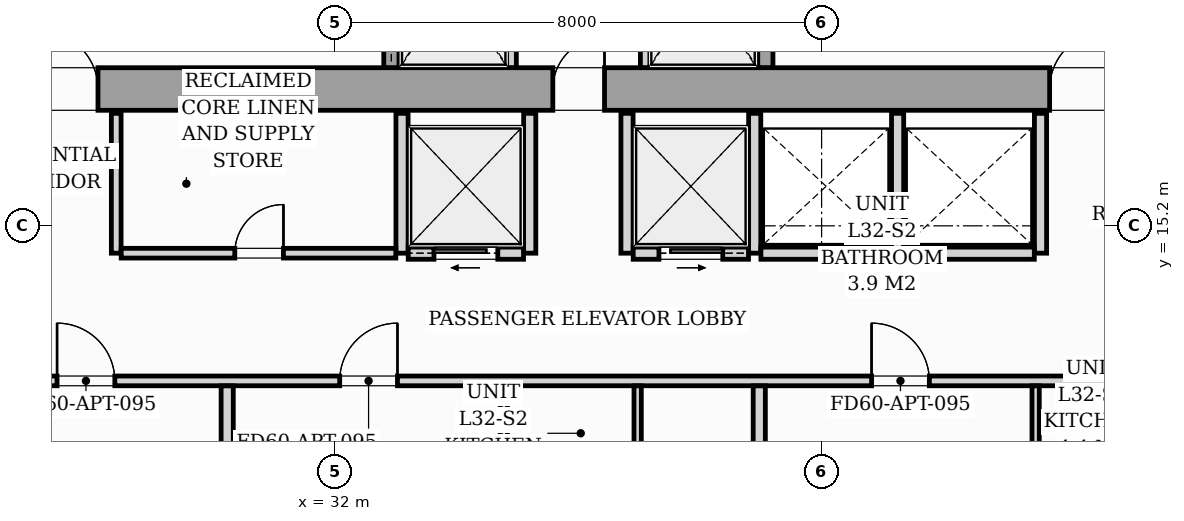
"""IFC4 building model, lengths in metres.
Left out: names, types, materials, properties, quantities, classifications, styles, units other than length and angle.
Written with IfcOpenShell. Run it as: python <this file> out.ifc"""

import sys

from ifc_helpers import new_model, si_unit, direction, frame, frame_2d, origin, origin_2d, place, context, subcontext, project, spatial, rectangle, i_section, extrude, source, transform, mapped, element, fill, save


model = new_model("IFC4")
c1 = context("Model", 3, precision=1e-05, world=origin(), true_north=direction((0.0, 1.0)))
c2 = subcontext(c1, "Body", "Model", "MODEL_VIEW")
j1 = project(units=[si_unit("LENGTHUNIT", "METRE"), si_unit("PLANEANGLEUNIT", "RADIAN")], contexts=[c1])
p1 = place(None, origin())
s1 = spatial("IfcSite", under=j1, at=p1, CompositionType="ELEMENT")
p2 = place(p1, origin())
s2 = spatial("IfcBuilding", under=s1, at=p2, CompositionType="ELEMENT")
p3 = place(p2, frame((0.0, 0.0, 113.0)))
s3 = spatial("IfcBuildingStorey", under=s2, at=p3, CompositionType="ELEMENT", Elevation=113.0)
m1 = source(origin(), c2, "Body", "SweptSolid", [
    extrude(i_section(OverallWidth=0.427, OverallDepth=0.483, WebThickness=0.051, FlangeThickness=0.082, FilletRadius=0.018, at=origin_2d()), origin(), (0.0, 0.0, 1.0), 3.196),
])
for number, where, z_axis, x_axis in (
    (1, (33.12, 17.4, 0.002), (0.0, 0.0, 1.0), (1.0, 0.0, 0.0)),
    (2, (38.88, 17.4, 0.002), (0.0, 0.0, 1.0), (1.0, 0.0, 0.0)),
):
    element("IfcColumn", number, at=place(p3, frame(where, z_axis=z_axis, x_axis=x_axis)), inside=s3, PredefinedType="PILASTER", context=c2, shape_type="MappedRepresentation", body=[
        mapped(m1, transform((0.0, 0.0, 0.0), scale=1.0)),
    ])
p4 = place(p3, frame((26.1, 17.45, 0.0), z_axis=(0.0, 0.0, 1.0), x_axis=(1.0, 0.0, 0.0)))
e3 = element("IfcWall", 3, at=p4, inside=s3, PredefinedType="SHEAR", context=c2, shape_type="SweptSolid", body=[
    extrude(rectangle(XDim=19.8, YDim=0.7, at=frame_2d((9.9, 0.0))), origin(), (0.0, 0.0, 1.0), 3.2),
])
p5 = place(p4, frame((1.05, 0.0, 0.0)))
e4 = element("IfcOpeningElement", 4, at=p5, cuts=e3, PredefinedType="OPENING", context=c2, shape_type="SweptSolid", body=[
    extrude(rectangle(XDim=0.95, YDim=2.06, at=frame_2d((0.475, 1.03))), frame((0.0, 0.36, 0.0), z_axis=(0.0, -1.0, 0.0), x_axis=(1.0, 0.0, 0.0)), (0.0, 0.0, 1.0), 0.72),
])
p6 = place(p4, frame((9.48, 0.0, 0.0)))
e5 = element("IfcOpeningElement", 5, at=p6, cuts=e3, PredefinedType="OPENING", context=c2, shape_type="SweptSolid", body=[
    extrude(rectangle(XDim=0.85, YDim=2.0, at=frame_2d((0.425, 1.0))), frame((0.0, 0.36, 0.0), z_axis=(0.0, -1.0, 0.0), x_axis=(1.0, 0.0, 0.0)), (0.0, 0.0, 1.0), 0.72),
])
p7 = place(p4, frame((17.65, 0.0, 0.0)))
e6 = element("IfcOpeningElement", 6, at=p7, cuts=e3, PredefinedType="OPENING", context=c2, shape_type="SweptSolid", body=[
    extrude(rectangle(XDim=0.95, YDim=2.06, at=frame_2d((0.475, 1.03))), frame((0.0, 0.36, 0.0), z_axis=(0.0, -1.0, 0.0), x_axis=(1.0, 0.0, 0.0)), (0.0, 0.0, 1.0), 0.72),
])
p8 = place(p3, frame((32.925, 17.802, 0.0), z_axis=(0.0, 0.0, 1.0), x_axis=(0.0, 1.0, 0.0)))
e7 = element("IfcWall", 7, at=p8, inside=s3, PredefinedType="SOLIDWALL", context=c2, shape_type="SweptSolid", body=[
    extrude(rectangle(XDim=2.646, YDim=0.25, at=frame_2d((1.323, 0.0))), origin(), (0.0, 0.0, 1.0), 3.2),
])
p9 = place(p8, frame((0.598, 0.0, 0.0)))
e8 = element("IfcOpeningElement", 8, at=p9, cuts=e7, PredefinedType="OPENING", context=c2, shape_type="SweptSolid", body=[
    extrude(rectangle(XDim=1.1, YDim=2.08, at=frame_2d((0.55, 1.04))), frame((0.0, 0.135, 0.0), z_axis=(0.0, -1.0, 0.0), x_axis=(1.0, 0.0, 0.0)), (0.0, 0.0, 1.0), 0.27),
])
for number, where, z_axis, x_axis in (
    (9, (34.9, 17.802, 0.0), (0.0, 0.0, 1.0), (0.0, 1.0, 0.0)),
    (10, (37.1, 17.802, 0.0), (0.0, 0.0, 1.0), (0.0, 1.0, 0.0)),
):
    element("IfcWall", number, at=place(p3, frame(where, z_axis=z_axis, x_axis=x_axis)), inside=s3, PredefinedType="PARTITIONING", context=c2, shape_type="SweptSolid", body=[
        extrude(rectangle(XDim=2.646, YDim=0.16, at=frame_2d((1.323, 0.0))), origin(), (0.0, 0.0, 1.0), 2.94),
    ])
p10 = place(p3, frame((39.075, 17.802, 0.0), z_axis=(0.0, 0.0, 1.0), x_axis=(0.0, 1.0, 0.0)))
e11 = element("IfcWall", 11, at=p10, inside=s3, PredefinedType="SOLIDWALL", context=c2, shape_type="SweptSolid", body=[
    extrude(rectangle(XDim=2.646, YDim=0.25, at=frame_2d((1.323, 0.0))), origin(), (0.0, 0.0, 1.0), 3.2),
])
p11 = place(p10, frame((0.598, 0.0, 0.0)))
e12 = element("IfcOpeningElement", 12, at=p11, cuts=e11, PredefinedType="OPENING", context=c2, shape_type="SweptSolid", body=[
    extrude(rectangle(XDim=1.1, YDim=2.08, at=frame_2d((0.55, 1.04))), frame((0.0, 0.135, 0.0), z_axis=(0.0, -1.0, 0.0), x_axis=(1.0, 0.0, 0.0)), (0.0, 0.0, 1.0), 0.27),
])
p12 = place(p3, frame((28.4, 14.75, 0.0), z_axis=(0.0, 0.0, 1.0), x_axis=(0.0, 1.0, 0.0)))
e13 = element("IfcWall", 13, at=p12, inside=s3, PredefinedType="PARTITIONING", context=c2, shape_type="SweptSolid", body=[
    extrude(rectangle(XDim=2.3, YDim=0.16, at=frame_2d((1.15, 0.0))), origin(), (0.0, 0.0, 1.0), 2.94),
])
p13 = place(p3, frame((33.1, 14.75, 0.0), z_axis=(0.0, 0.0, 1.0), x_axis=(0.0, 1.0, 0.0)))
e14 = element("IfcWall", 14, at=p13, inside=s3, PredefinedType="PARTITIONING", context=c2, shape_type="SweptSolid", body=[
    extrude(rectangle(XDim=2.3, YDim=0.2, at=frame_2d((1.15, 0.0))), origin(), (0.0, 0.0, 1.0), 2.94),
])
p14 = place(p3, frame((28.482, 14.75, 0.0), z_axis=(0.0, 0.0, 1.0), x_axis=(1.0, 0.0, 0.0)))
e15 = element("IfcWall", 15, at=p14, inside=s3, PredefinedType="PARTITIONING", context=c2, shape_type="SweptSolid", body=[
    extrude(rectangle(XDim=4.516, YDim=0.16, at=frame_2d((2.258, 0.0))), origin(), (0.0, 0.0, 1.0), 2.94),
])
p15 = place(p14, frame((1.868, 0.0, 0.0)))
e16 = element("IfcOpeningElement", 16, at=p15, cuts=e15, PredefinedType="OPENING", context=c2, shape_type="SweptSolid", body=[
    extrude(rectangle(XDim=0.8, YDim=2.05, at=frame_2d((0.4, 1.025))), frame((0.0, 0.09, 0.0), z_axis=(0.0, -1.0, 0.0), x_axis=(1.0, 0.0, 0.0)), (0.0, 0.0, 1.0), 0.18),
])
p16 = place(p3, frame((35.2, 14.75, 0.0), z_axis=(0.0, 0.0, 1.0), x_axis=(0.0, 1.0, 0.0)))
e17 = element("IfcWall", 17, at=p16, inside=s3, PredefinedType="PARTITIONING", context=c2, shape_type="SweptSolid", body=[
    extrude(rectangle(XDim=2.3, YDim=0.2, at=frame_2d((1.15, 0.0))), origin(), (0.0, 0.0, 1.0), 2.94),
])
p17 = place(p3, frame((33.202, 14.75, 0.0), z_axis=(0.0, 0.0, 1.0), x_axis=(1.0, 0.0, 0.0)))
e18 = element("IfcWall", 18, at=p17, inside=s3, PredefinedType="PARTITIONING", context=c2, shape_type="SweptSolid", body=[
    extrude(rectangle(XDim=1.896, YDim=0.2, at=frame_2d((0.948, 0.0))), origin(), (0.0, 0.0, 1.0), 2.94),
])
p18 = place(p17, frame((0.423, 0.0, 0.0)))
e19 = element("IfcOpeningElement", 19, at=p18, cuts=e18, PredefinedType="OPENING", context=c2, shape_type="SweptSolid", body=[
    extrude(rectangle(XDim=1.05, YDim=2.08, at=frame_2d((0.525, 1.04))), frame((0.0, 0.11, 0.0), z_axis=(0.0, -1.0, 0.0), x_axis=(1.0, 0.0, 0.0)), (0.0, 0.0, 1.0), 0.22),
])
for number, where, z_axis, x_axis in (
    (20, (36.8, 14.75, 0.0), (0.0, 0.0, 1.0), (0.0, 1.0, 0.0)),
    (21, (38.9, 14.75, 0.0), (0.0, 0.0, 1.0), (0.0, 1.0, 0.0)),
):
    element("IfcWall", number, at=place(p3, frame(where, z_axis=z_axis, x_axis=x_axis)), inside=s3, PredefinedType="PARTITIONING", context=c2, shape_type="SweptSolid", body=[
        extrude(rectangle(XDim=2.3, YDim=0.2, at=frame_2d((1.15, 0.0))), origin(), (0.0, 0.0, 1.0), 2.94),
    ])
p19 = place(p3, frame((36.902, 14.75, 0.0), z_axis=(0.0, 0.0, 1.0), x_axis=(1.0, 0.0, 0.0)))
e22 = element("IfcWall", 22, at=p19, inside=s3, PredefinedType="PARTITIONING", context=c2, shape_type="SweptSolid", body=[
    extrude(rectangle(XDim=1.896, YDim=0.2, at=frame_2d((0.948, 0.0))), origin(), (0.0, 0.0, 1.0), 2.94),
])
p20 = place(p19, frame((0.423, 0.0, 0.0)))
e23 = element("IfcOpeningElement", 23, at=p20, cuts=e22, PredefinedType="OPENING", context=c2, shape_type="SweptSolid", body=[
    extrude(rectangle(XDim=1.05, YDim=2.08, at=frame_2d((0.525, 1.04))), frame((0.0, 0.11, 0.0), z_axis=(0.0, -1.0, 0.0), x_axis=(1.0, 0.0, 0.0)), (0.0, 0.0, 1.0), 0.22),
])
for number, where, z_axis, x_axis in (
    (24, (41.25, 14.75, 0.0), (0.0, 0.0, 1.0), (0.0, 1.0, 0.0)),
    (25, (43.6, 14.75, 0.0), (0.0, 0.0, 1.0), (0.0, 1.0, 0.0)),
):
    element("IfcWall", number, at=place(p3, frame(where, z_axis=z_axis, x_axis=x_axis)), inside=s3, PredefinedType="PARTITIONING", context=c2, shape_type="SweptSolid", body=[
        extrude(rectangle(XDim=2.3, YDim=0.2, at=frame_2d((1.15, 0.0))), origin(), (0.0, 0.0, 1.0), 2.94),
    ])
for number, where, z_axis, x_axis in (
    (26, (39.002, 14.75, 0.0), (0.0, 0.0, 1.0), (1.0, 0.0, 0.0)),
    (27, (41.352, 14.75, 0.0), (0.0, 0.0, 1.0), (1.0, 0.0, 0.0)),
):
    element("IfcWall", number, at=place(p3, frame(where, z_axis=z_axis, x_axis=x_axis)), inside=s3, PredefinedType="PARTITIONING", context=c2, shape_type="SweptSolid", body=[
        extrude(rectangle(XDim=2.146, YDim=0.2, at=frame_2d((1.073, 0.0))), origin(), (0.0, 0.0, 1.0), 2.94),
    ])
p21 = place(p3, frame((21.5, 12.65, 0.0), z_axis=(0.0, 0.0, 1.0), x_axis=(1.0, 0.0, 0.0)))
e28 = element("IfcWall", 28, at=p21, inside=s3, PredefinedType="PARTITIONING", context=c2, shape_type="SweptSolid", body=[
    extrude(rectangle(XDim=26.2, YDim=0.16, at=frame_2d((13.1, 0.0))), origin(), (0.0, 0.0, 1.0), 2.94),
])
p22 = place(p21, frame((5.927, 0.0, 0.0)))
e29 = element("IfcOpeningElement", 29, at=p22, cuts=e28, PredefinedType="OPENING", context=c2, shape_type="SweptSolid", body=[
    extrude(rectangle(XDim=0.95, YDim=2.06, at=frame_2d((0.475, 1.03))), frame((0.0, 0.09, 0.0), z_axis=(0.0, -1.0, 0.0), x_axis=(1.0, 0.0, 0.0)), (0.0, 0.0, 1.0), 0.18),
])
p23 = place(p21, frame((10.575, 0.0, 0.0)))
e30 = element("IfcOpeningElement", 30, at=p23, cuts=e28, PredefinedType="OPENING", context=c2, shape_type="SweptSolid", body=[
    extrude(rectangle(XDim=0.95, YDim=2.06, at=frame_2d((0.475, 1.03))), frame((0.0, 0.09, 0.0), z_axis=(0.0, -1.0, 0.0), x_axis=(1.0, 0.0, 0.0)), (0.0, 0.0, 1.0), 0.18),
])
p24 = place(p21, frame((19.322, 0.0, 0.0)))
e31 = element("IfcOpeningElement", 31, at=p24, cuts=e28, PredefinedType="OPENING", context=c2, shape_type="SweptSolid", body=[
    extrude(rectangle(XDim=0.95, YDim=2.06, at=frame_2d((0.475, 1.03))), frame((0.0, 0.09, 0.0), z_axis=(0.0, -1.0, 0.0), x_axis=(1.0, 0.0, 0.0)), (0.0, 0.0, 1.0), 0.18),
])
p25 = place(p3, frame((30.225, 5.653, 0.0), z_axis=(0.0, 0.0, 1.0), x_axis=(0.0, 1.0, 0.0)))
e32 = element("IfcWall", 32, at=p25, inside=s3, PredefinedType="PARTITIONING", context=c2, shape_type="SweptSolid", body=[
    extrude(rectangle(XDim=6.916, YDim=0.2, at=frame_2d((3.458, 0.0))), origin(), (0.0, 0.0, 1.0), 2.94),
])
for number, where, z_axis, x_axis in (
    (33, (34.775, 10.462, 0.0), (0.0, 0.0, 1.0), (0.0, 1.0, 0.0)),
    (34, (36.975, 10.462, 0.0), (0.0, 0.0, 1.0), (0.0, 1.0, 0.0)),
):
    element("IfcWall", number, at=place(p3, frame(where, z_axis=z_axis, x_axis=x_axis)), inside=s3, PredefinedType="PARTITIONING", context=c2, shape_type="SweptSolid", body=[
        extrude(rectangle(XDim=2.106, YDim=0.12, at=frame_2d((1.053, 0.0))), origin(), (0.0, 0.0, 1.0), 2.94),
    ])
p26 = place(p3, frame((38.975, 10.462, 0.0), z_axis=(0.0, 0.0, 1.0), x_axis=(0.0, 1.0, 0.0)))
e35 = element("IfcWall", 35, at=p26, inside=s3, PredefinedType="PARTITIONING", context=c2, shape_type="SweptSolid", body=[
    extrude(rectangle(XDim=2.106, YDim=0.2, at=frame_2d((1.053, 0.0))), origin(), (0.0, 0.0, 1.0), 2.94),
])
p27 = place(p3, frame((43.52, 10.462, 0.0), z_axis=(0.0, 0.0, 1.0), x_axis=(0.0, 1.0, 0.0)))
e36 = element("IfcWall", 36, at=p27, inside=s3, PredefinedType="PARTITIONING", context=c2, shape_type="SweptSolid", body=[
    extrude(rectangle(XDim=2.106, YDim=0.12, at=frame_2d((1.053, 0.0))), origin(), (0.0, 0.0, 1.0), 2.94),
])
m2 = source(origin(), c2, "Body", "SweptSolid", [
    extrude(rectangle(XDim=0.95, YDim=2.06, at=frame_2d((0.475, 1.03))), frame((0.0, 0.025, 0.0), z_axis=(0.0, -1.0, 0.0), x_axis=(1.0, 0.0, 0.0)), (0.0, 0.0, 1.0), 0.05),
])
p28 = place(p5, origin())
e37 = element("IfcDoor", 37, at=p28, inside=s3, OperationType="SINGLE_SWING_LEFT", PredefinedType="DOOR", context=c2, shape_type="MappedRepresentation", body=[
    mapped(m2, transform((0.0, 0.0, 0.0), scale=1.0)),
])
fill(e4, e37)
m3 = source(origin(), c2, "Body", "SweptSolid", [
    extrude(rectangle(XDim=0.85, YDim=2.0, at=frame_2d((0.425, 1.0))), frame((0.0, 0.025, 0.0), z_axis=(0.0, -1.0, 0.0), x_axis=(1.0, 0.0, 0.0)), (0.0, 0.0, 1.0), 0.05),
])
p29 = place(p6, origin())
e38 = element("IfcDoor", 38, at=p29, inside=s3, OperationType="SINGLE_SWING_RIGHT", PredefinedType="DOOR", context=c2, shape_type="MappedRepresentation", body=[
    mapped(m3, transform((0.0, 0.0, 0.0), scale=1.0)),
])
fill(e5, e38)
p30 = place(p7, origin())
e39 = element("IfcDoor", 39, at=p30, inside=s3, OperationType="SINGLE_SWING_RIGHT", PredefinedType="DOOR", context=c2, shape_type="MappedRepresentation", body=[
    mapped(m2, transform((0.0, 0.0, 0.0), scale=1.0)),
])
fill(e6, e39)
m4 = source(origin(), c2, "Body", "SweptSolid", [
    extrude(rectangle(XDim=0.8, YDim=2.05, at=frame_2d((0.4, 1.025))), frame((0.0, 0.025, 0.0), z_axis=(0.0, -1.0, 0.0), x_axis=(1.0, 0.0, 0.0)), (0.0, 0.0, 1.0), 0.05),
])
p31 = place(p15, origin())
e40 = element("IfcDoor", 40, at=p31, inside=s3, OperationType="SINGLE_SWING_RIGHT", PredefinedType="DOOR", context=c2, shape_type="MappedRepresentation", body=[
    mapped(m4, transform((0.0, 0.0, 0.0), scale=1.0)),
])
fill(e16, e40)
m5 = source(origin(), c2, "Body", "SweptSolid", [
    extrude(rectangle(XDim=1.05, YDim=2.08, at=frame_2d((0.525, 1.04))), frame((0.0, 0.025, 0.0), z_axis=(0.0, -1.0, 0.0), x_axis=(1.0, 0.0, 0.0)), (0.0, 0.0, 1.0), 0.05),
])
p32 = place(p18, origin())
e41 = element("IfcDoor", 41, at=p32, inside=s3, OperationType="SLIDING_TO_LEFT", PredefinedType="DOOR", context=c2, shape_type="MappedRepresentation", body=[
    mapped(m5, transform((0.0, 0.0, 0.0), scale=1.0)),
])
fill(e19, e41)
p33 = place(p20, origin())
e42 = element("IfcDoor", 42, at=p33, inside=s3, OperationType="SLIDING_TO_RIGHT", PredefinedType="DOOR", context=c2, shape_type="MappedRepresentation", body=[
    mapped(m5, transform((0.0, 0.0, 0.0), scale=1.0)),
])
fill(e23, e42)
m6 = source(origin(), c2, "Body", "SweptSolid", [
    extrude(rectangle(XDim=0.95, YDim=2.06, at=frame_2d((0.475, 1.03))), frame((0.0, 0.025, 0.0), z_axis=(0.0, -1.0, 0.0), x_axis=(1.0, 0.0, 0.0)), (0.0, 0.0, 1.0), 0.05),
])
p34 = place(p22, origin())
e43 = element("IfcDoor", 43, at=p34, inside=s3, OperationType="SINGLE_SWING_LEFT", PredefinedType="DOOR", context=c2, shape_type="MappedRepresentation", body=[
    mapped(m6, transform((0.0, 0.0, 0.0), scale=1.0)),
])
fill(e29, e43)
p35 = place(p23, origin())
e44 = element("IfcDoor", 44, at=p35, inside=s3, OperationType="SINGLE_SWING_RIGHT", PredefinedType="DOOR", context=c2, shape_type="MappedRepresentation", body=[
    mapped(m6, transform((0.0, 0.0, 0.0), scale=1.0)),
])
fill(e30, e44)
p36 = place(p24, origin())
e45 = element("IfcDoor", 45, at=p36, inside=s3, OperationType="SINGLE_SWING_LEFT", PredefinedType="DOOR", context=c2, shape_type="MappedRepresentation", body=[
    mapped(m6, transform((0.0, 0.0, 0.0), scale=1.0)),
])
fill(e31, e45)
save(model, sys.argv[1])
